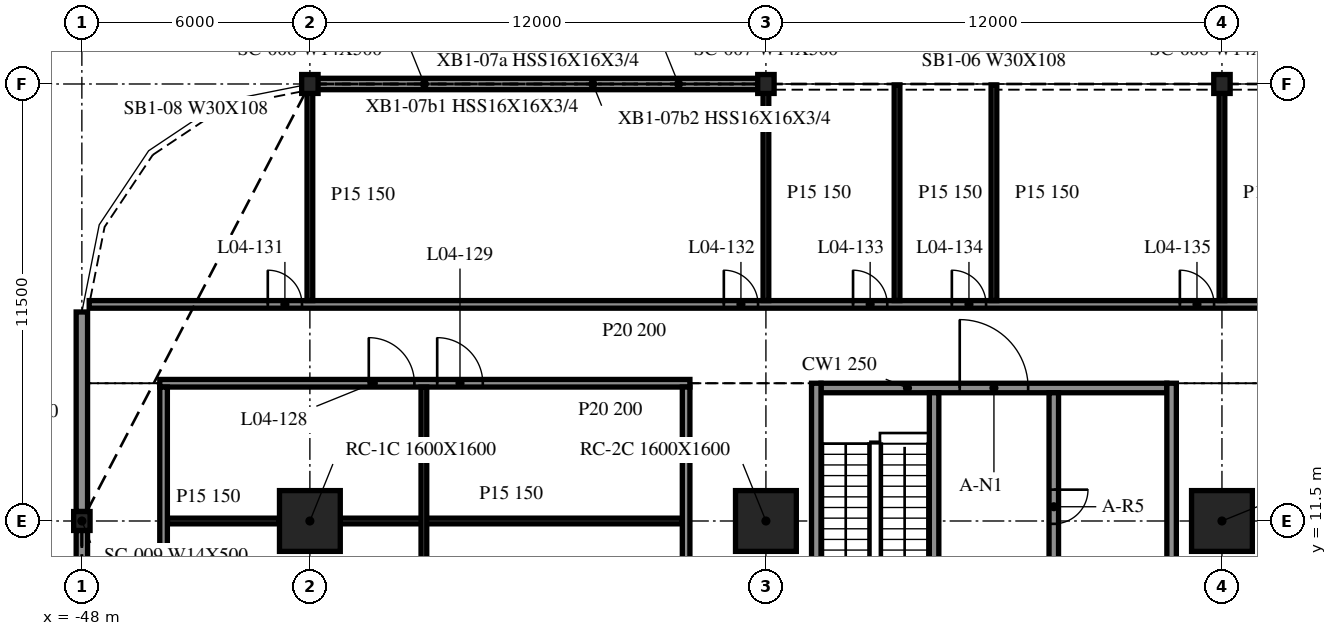
"""IFC4 building model, lengths in metres.
Left out: names, types, materials, properties, quantities, classifications, styles, units other than length and angle.
Written with IfcOpenShell. Run it as: python <this file> out.ifc"""

import sys

from ifc_helpers import new_model, si_unit, direction, frame, frame_2d, origin, origin_2d, place, context, subcontext, project, spatial, rectangle, i_section, extrude, element, fill, save


model = new_model("IFC4")
c1 = context("Model", 3, precision=1e-05, world=origin(), true_north=direction((0.0, 1.0)))
c2 = subcontext(c1, "Body", "Model", "MODEL_VIEW")
j1 = project(units=[si_unit("LENGTHUNIT", "METRE"), si_unit("PLANEANGLEUNIT", "RADIAN")], contexts=[c1])
p1 = place(None, origin())
s1 = spatial("IfcSite", under=j1, at=p1, CompositionType="ELEMENT")
p2 = place(p1, origin())
s2 = spatial("IfcBuilding", under=s1, at=p2, CompositionType="ELEMENT")
p3 = place(p2, frame((0.0, 0.0, 20.1)))
s3 = spatial("IfcBuildingStorey", under=s2, at=p3, CompositionType="ELEMENT", Elevation=20.1)
for number, where, z_axis, x_axis in (
    (1, (-42.0, 11.5, -0.34), (0.0, 0.0, 1.0), (1.0, 0.0, 0.0)),
    (2, (-30.0, 11.5, -0.34), (0.0, 0.0, 1.0), (1.0, 0.0, 0.0)),
    (3, (-18.0, 11.5, -0.34), (0.0, 0.0, 1.0), (1.0, 0.0, 0.0)),
):
    element("IfcColumn", number, at=place(p3, frame(where, z_axis=z_axis, x_axis=x_axis)), inside=s3, PredefinedType="COLUMN", context=c2, shape_type="SweptSolid", body=[
        extrude(rectangle(XDim=1.6, YDim=1.6, at=origin_2d()), origin(), (0.0, 0.0, 1.0), 4.3),
    ])
for number, where, z_axis, x_axis in (
    (4, (-18.0, 23.0, -0.34), (0.0, 0.0, 1.0), (1.0, 0.0, 0.0)),
    (5, (-30.0, 23.0, -0.34), (0.0, 0.0, 1.0), (1.0, 0.0, 0.0)),
    (6, (-42.0, 23.0, -0.34), (0.0, 0.0, 1.0), (1.0, 0.0, 0.0)),
    (7, (-48.0, 11.5, -0.34), (0.0, 0.0, 1.0), (1.0, 0.0, 0.0)),
):
    element("IfcColumn", number, at=place(p3, frame(where, z_axis=z_axis, x_axis=x_axis)), inside=s3, PredefinedType="COLUMN", context=c2, shape_type="SweptSolid", body=[
        extrude(i_section(OverallWidth=0.432, OverallDepth=0.498, WebThickness=0.056, FlangeThickness=0.089, at=origin_2d()), origin(), (0.0, 0.0, 1.0), 4.3),
    ])
p4 = place(p3, frame((-30.028, 23.0, 0.0), z_axis=(0.0, 0.0, 1.0), x_axis=(-1.0, 0.0, 0.0)))
e8 = element("IfcWall", 8, at=p4, inside=s3, PredefinedType="NOTDEFINED", context=c2, shape_type="SweptSolid", body=[
    extrude(rectangle(XDim=11.944, YDim=0.3, at=frame_2d((5.972, 0.0))), origin(), (0.0, 0.0, 1.0), 3.203),
])
p5 = place(p3, frame((-48.0, 17.0, 0.0), z_axis=(0.0, 0.0, 1.0), x_axis=(0.0, -1.0, 0.0)))
e9 = element("IfcWall", 9, at=p5, inside=s3, PredefinedType="NOTDEFINED", context=c2, shape_type="SweptSolid", body=[
    extrude(rectangle(XDim=5.251, YDim=0.3, at=frame_2d((2.625, 0.0))), origin(), (0.0, 0.0, 1.0), 3.203),
])
p6 = place(p3, frame((-48.0, 11.251, 0.0), z_axis=(0.0, 0.0, 1.0), x_axis=(0.0, -1.0, 0.0)))
e10 = element("IfcWall", 10, at=p6, inside=s3, PredefinedType="NOTDEFINED", context=c2, shape_type="SweptSolid", body=[
    extrude(rectangle(XDim=11.002, YDim=0.3, at=frame_2d((5.501, 0.0))), origin(), (0.0, 0.0, 1.0), 3.203),
])
for number, where, z_axis, x_axis in (
    (11, (-28.675, 15.125, 0.0), (0.0, 0.0, 1.0), (0.0, -1.0, 0.0)),
    (12, (-19.325, -9.125, 0.0), (0.0, 0.0, 1.0), (0.0, 1.0, 0.0)),
):
    element("IfcWall", number, at=place(p3, frame(where, z_axis=z_axis, x_axis=x_axis)), inside=s3, PredefinedType="SOLIDWALL", context=c2, shape_type="SweptSolid", body=[
        extrude(rectangle(XDim=24.25, YDim=0.25, at=frame_2d((12.125, 0.0))), origin(), (0.0, 0.0, 1.0), 3.96),
    ])
p7 = place(p3, frame((-28.55, 15.0, 0.0), z_axis=(0.0, 0.0, 1.0), x_axis=(1.0, 0.0, 0.0)))
e13 = element("IfcWall", 13, at=p7, inside=s3, PredefinedType="SOLIDWALL", context=c2, shape_type="SweptSolid", body=[
    extrude(rectangle(XDim=9.1, YDim=0.25, at=frame_2d((4.55, 0.0))), origin(), (0.0, 0.0, 1.0), 3.96),
])
p8 = place(p7, frame((3.65, 0.0, 0.0)))
e14 = element("IfcOpeningElement", 14, at=p8, cuts=e13, PredefinedType="OPENING", context=c2, shape_type="SweptSolid", body=[
    extrude(rectangle(XDim=1.8, YDim=2.1, at=frame_2d((0.9, 1.05))), frame((0.0, 0.135, 0.0), z_axis=(0.0, -1.0, 0.0), x_axis=(1.0, 0.0, 0.0)), (0.0, 0.0, 1.0), 0.27),
])
p9 = place(p3, frame((-25.575, 14.875, 0.0), z_axis=(0.0, 0.0, 1.0), x_axis=(0.0, -1.0, 0.0)))
e15 = element("IfcWall", 15, at=p9, inside=s3, PredefinedType="SOLIDWALL", context=c2, shape_type="SweptSolid", body=[
    extrude(rectangle(XDim=6.25, YDim=0.25, at=frame_2d((3.125, 0.0))), origin(), (0.0, 0.0, 1.0), 3.96),
])
p10 = place(p9, frame((4.85, 0.0, 0.0)))
e16 = element("IfcOpeningElement", 16, at=p10, cuts=e15, PredefinedType="OPENING", context=c2, shape_type="SweptSolid", body=[
    extrude(rectangle(XDim=1.0, YDim=2.1, at=frame_2d((0.5, 1.05))), frame((0.0, 0.135, 0.0), z_axis=(0.0, -1.0, 0.0), x_axis=(1.0, 0.0, 0.0)), (0.0, 0.0, 1.0), 0.27),
])
p11 = place(p3, frame((-22.425, 14.875, 0.0), z_axis=(0.0, 0.0, 1.0), x_axis=(0.0, -1.0, 0.0)))
e17 = element("IfcWall", 17, at=p11, inside=s3, PredefinedType="SOLIDWALL", context=c2, shape_type="SweptSolid", body=[
    extrude(rectangle(XDim=23.75, YDim=0.25, at=frame_2d((11.875, 0.0))), origin(), (0.0, 0.0, 1.0), 3.96),
])
p12 = place(p11, frame((15.45, 0.0, 0.0)))
e18 = element("IfcOpeningElement", 18, at=p12, cuts=e17, PredefinedType="OPENING", context=c2, shape_type="SweptSolid", body=[
    extrude(rectangle(XDim=1.1, YDim=2.1, at=frame_2d((0.55, 1.05))), frame((0.0, 0.135, 0.0), z_axis=(0.0, -1.0, 0.0), x_axis=(1.0, 0.0, 0.0)), (0.0, 0.0, 1.0), 0.27),
])
p13 = place(p11, frame((12.7, 0.0, 0.0)))
e19 = element("IfcOpeningElement", 19, at=p13, cuts=e17, PredefinedType="OPENING", context=c2, shape_type="SweptSolid", body=[
    extrude(rectangle(XDim=1.1, YDim=2.1, at=frame_2d((0.55, 1.05))), frame((0.0, 0.135, 0.0), z_axis=(0.0, -1.0, 0.0), x_axis=(1.0, 0.0, 0.0)), (0.0, 0.0, 1.0), 0.27),
])
p14 = place(p11, frame((22.137, 0.0, 0.0)))
e20 = element("IfcOpeningElement", 20, at=p14, cuts=e17, PredefinedType="OPENING", context=c2, shape_type="SweptSolid", body=[
    extrude(rectangle(XDim=0.9, YDim=2.1, at=frame_2d((0.45, 1.05))), frame((0.0, 0.135, 0.0), z_axis=(0.0, -1.0, 0.0), x_axis=(1.0, 0.0, 0.0)), (0.0, 0.0, 1.0), 0.27),
])
p15 = place(p11, frame((19.062, 0.0, 0.0)))
e21 = element("IfcOpeningElement", 21, at=p15, cuts=e17, PredefinedType="OPENING", context=c2, shape_type="SweptSolid", body=[
    extrude(rectangle(XDim=0.9, YDim=2.1, at=frame_2d((0.45, 1.05))), frame((0.0, 0.135, 0.0), z_axis=(0.0, -1.0, 0.0), x_axis=(1.0, 0.0, 0.0)), (0.0, 0.0, 1.0), 0.27),
])
p16 = place(p11, frame((2.55, 0.0, 0.0)))
e22 = element("IfcOpeningElement", 22, at=p16, cuts=e17, PredefinedType="OPENING", context=c2, shape_type="SweptSolid", body=[
    extrude(rectangle(XDim=0.9, YDim=2.1, at=frame_2d((0.45, 1.05))), frame((0.0, 0.135, 0.0), z_axis=(0.0, -1.0, 0.0), x_axis=(1.0, 0.0, 0.0)), (0.0, 0.0, 1.0), 0.27),
])
p17 = place(p3, frame((-45.75, 11.5, 0.0), z_axis=(0.0, 0.0, 1.0), x_axis=(1.0, 0.0, 0.0)))
e23 = element("IfcWall", 23, at=p17, inside=s3, PredefinedType="PARTITIONING", context=c2, shape_type="SweptSolid", body=[
    extrude(rectangle(XDim=2.95, YDim=0.15, at=frame_2d((1.475, 0.0))), origin(), (0.0, 0.0, 1.0), 3.96),
])
p18 = place(p3, frame((-41.2, 11.5, 0.0), z_axis=(0.0, 0.0, 1.0), x_axis=(1.0, 0.0, 0.0)))
e24 = element("IfcWall", 24, at=p18, inside=s3, PredefinedType="PARTITIONING", context=c2, shape_type="SweptSolid", body=[
    extrude(rectangle(XDim=9.0, YDim=0.15, at=frame_2d((4.5, 0.0))), origin(), (0.0, 0.0, 1.0), 3.96),
])
p19 = place(p3, frame((-45.95, 15.125, 0.0), z_axis=(0.0, 0.0, 1.0), x_axis=(1.0, 0.0, 0.0)))
e25 = element("IfcWall", 25, at=p19, inside=s3, PredefinedType="PARTITIONING", context=c2, shape_type="SweptSolid", body=[
    extrude(rectangle(XDim=13.95, YDim=0.2, at=frame_2d((6.975, 0.0))), origin(), (0.0, 0.0, 1.0), 3.96),
])
p20 = place(p19, frame((5.5, 0.0, 0.0)))
e26 = element("IfcOpeningElement", 26, at=p20, cuts=e25, PredefinedType="OPENING", context=c2, shape_type="SweptSolid", body=[
    extrude(rectangle(XDim=1.2, YDim=2.1, at=frame_2d((0.6, 1.05))), frame((0.0, 0.11, 0.0), z_axis=(0.0, -1.0, 0.0), x_axis=(1.0, 0.0, 0.0)), (0.0, 0.0, 1.0), 0.22),
])
p21 = place(p19, frame((7.3, 0.0, 0.0)))
e27 = element("IfcOpeningElement", 27, at=p21, cuts=e25, PredefinedType="OPENING", context=c2, shape_type="SweptSolid", body=[
    extrude(rectangle(XDim=1.2, YDim=2.1, at=frame_2d((0.6, 1.05))), frame((0.0, 0.11, 0.0), z_axis=(0.0, -1.0, 0.0), x_axis=(1.0, 0.0, 0.0)), (0.0, 0.0, 1.0), 0.22),
])
p22 = place(p3, frame((-47.807, 17.2, 0.0), z_axis=(0.0, 0.0, 1.0), x_axis=(1.0, 0.0, 0.0)))
e28 = element("IfcWall", 28, at=p22, inside=s3, PredefinedType="PARTITIONING", context=c2, shape_type="SweptSolid", body=[
    extrude(rectangle(XDim=95.615, YDim=0.2, at=frame_2d((47.807, 0.0))), origin(), (0.0, 0.0, 1.0), 3.96),
])
p23 = place(p22, frame((4.7, 0.0, 0.0)))
e29 = element("IfcOpeningElement", 29, at=p23, cuts=e28, PredefinedType="OPENING", context=c2, shape_type="SweptSolid", body=[
    extrude(rectangle(XDim=0.9, YDim=2.1, at=frame_2d((0.45, 1.05))), frame((0.0, 0.11, 0.0), z_axis=(0.0, -1.0, 0.0), x_axis=(1.0, 0.0, 0.0)), (0.0, 0.0, 1.0), 0.22),
])
p24 = place(p22, frame((16.7, 0.0, 0.0)))
e30 = element("IfcOpeningElement", 30, at=p24, cuts=e28, PredefinedType="OPENING", context=c2, shape_type="SweptSolid", body=[
    extrude(rectangle(XDim=0.9, YDim=2.1, at=frame_2d((0.45, 1.05))), frame((0.0, 0.11, 0.0), z_axis=(0.0, -1.0, 0.0), x_axis=(1.0, 0.0, 0.0)), (0.0, 0.0, 1.0), 0.22),
])
p25 = place(p22, frame((20.1, 0.0, 0.0)))
e31 = element("IfcOpeningElement", 31, at=p25, cuts=e28, PredefinedType="OPENING", context=c2, shape_type="SweptSolid", body=[
    extrude(rectangle(XDim=0.9, YDim=2.1, at=frame_2d((0.45, 1.05))), frame((0.0, 0.11, 0.0), z_axis=(0.0, -1.0, 0.0), x_axis=(1.0, 0.0, 0.0)), (0.0, 0.0, 1.0), 0.22),
])
p26 = place(p22, frame((22.7, 0.0, 0.0)))
e32 = element("IfcOpeningElement", 32, at=p26, cuts=e28, PredefinedType="OPENING", context=c2, shape_type="SweptSolid", body=[
    extrude(rectangle(XDim=0.9, YDim=2.1, at=frame_2d((0.45, 1.05))), frame((0.0, 0.11, 0.0), z_axis=(0.0, -1.0, 0.0), x_axis=(1.0, 0.0, 0.0)), (0.0, 0.0, 1.0), 0.22),
])
p27 = place(p22, frame((28.7, 0.0, 0.0)))
e33 = element("IfcOpeningElement", 33, at=p27, cuts=e28, PredefinedType="OPENING", context=c2, shape_type="SweptSolid", body=[
    extrude(rectangle(XDim=0.9, YDim=2.1, at=frame_2d((0.45, 1.05))), frame((0.0, 0.11, 0.0), z_axis=(0.0, -1.0, 0.0), x_axis=(1.0, 0.0, 0.0)), (0.0, 0.0, 1.0), 0.22),
])
p28 = place(p22, frame((40.7, 0.0, 0.0)))
e34 = element("IfcOpeningElement", 34, at=p28, cuts=e28, PredefinedType="OPENING", context=c2, shape_type="SweptSolid", body=[
    extrude(rectangle(XDim=0.9, YDim=2.1, at=frame_2d((0.45, 1.05))), frame((0.0, 0.11, 0.0), z_axis=(0.0, -1.0, 0.0), x_axis=(1.0, 0.0, 0.0)), (0.0, 0.0, 1.0), 0.22),
])
p29 = place(p22, frame((44.1, 0.0, 0.0)))
e35 = element("IfcOpeningElement", 35, at=p29, cuts=e28, PredefinedType="OPENING", context=c2, shape_type="SweptSolid", body=[
    extrude(rectangle(XDim=0.9, YDim=2.1, at=frame_2d((0.45, 1.05))), frame((0.0, 0.11, 0.0), z_axis=(0.0, -1.0, 0.0), x_axis=(1.0, 0.0, 0.0)), (0.0, 0.0, 1.0), 0.22),
])
p30 = place(p22, frame((46.7, 0.0, 0.0)))
e36 = element("IfcOpeningElement", 36, at=p30, cuts=e28, PredefinedType="OPENING", context=c2, shape_type="SweptSolid", body=[
    extrude(rectangle(XDim=0.9, YDim=2.1, at=frame_2d((0.45, 1.05))), frame((0.0, 0.11, 0.0), z_axis=(0.0, -1.0, 0.0), x_axis=(1.0, 0.0, 0.0)), (0.0, 0.0, 1.0), 0.22),
])
p31 = place(p22, frame((48.1, 0.0, 0.0)))
e37 = element("IfcOpeningElement", 37, at=p31, cuts=e28, PredefinedType="OPENING", context=c2, shape_type="SweptSolid", body=[
    extrude(rectangle(XDim=0.9, YDim=2.1, at=frame_2d((0.45, 1.05))), frame((0.0, 0.11, 0.0), z_axis=(0.0, -1.0, 0.0), x_axis=(1.0, 0.0, 0.0)), (0.0, 0.0, 1.0), 0.22),
])
p32 = place(p22, frame((54.1, 0.0, 0.0)))
e38 = element("IfcOpeningElement", 38, at=p32, cuts=e28, PredefinedType="OPENING", context=c2, shape_type="SweptSolid", body=[
    extrude(rectangle(XDim=0.9, YDim=2.1, at=frame_2d((0.45, 1.05))), frame((0.0, 0.11, 0.0), z_axis=(0.0, -1.0, 0.0), x_axis=(1.0, 0.0, 0.0)), (0.0, 0.0, 1.0), 0.22),
])
p33 = place(p22, frame((66.1, 0.0, 0.0)))
e39 = element("IfcOpeningElement", 39, at=p33, cuts=e28, PredefinedType="OPENING", context=c2, shape_type="SweptSolid", body=[
    extrude(rectangle(XDim=0.9, YDim=2.1, at=frame_2d((0.45, 1.05))), frame((0.0, 0.11, 0.0), z_axis=(0.0, -1.0, 0.0), x_axis=(1.0, 0.0, 0.0)), (0.0, 0.0, 1.0), 0.22),
])
p34 = place(p22, frame((69.5, 0.0, 0.0)))
e40 = element("IfcOpeningElement", 40, at=p34, cuts=e28, PredefinedType="OPENING", context=c2, shape_type="SweptSolid", body=[
    extrude(rectangle(XDim=0.9, YDim=2.1, at=frame_2d((0.45, 1.05))), frame((0.0, 0.11, 0.0), z_axis=(0.0, -1.0, 0.0), x_axis=(1.0, 0.0, 0.0)), (0.0, 0.0, 1.0), 0.22),
])
p35 = place(p22, frame((72.1, 0.0, 0.0)))
e41 = element("IfcOpeningElement", 41, at=p35, cuts=e28, PredefinedType="OPENING", context=c2, shape_type="SweptSolid", body=[
    extrude(rectangle(XDim=0.9, YDim=2.1, at=frame_2d((0.45, 1.05))), frame((0.0, 0.11, 0.0), z_axis=(0.0, -1.0, 0.0), x_axis=(1.0, 0.0, 0.0)), (0.0, 0.0, 1.0), 0.22),
])
p36 = place(p22, frame((78.1, 0.0, 0.0)))
e42 = element("IfcOpeningElement", 42, at=p36, cuts=e28, PredefinedType="OPENING", context=c2, shape_type="SweptSolid", body=[
    extrude(rectangle(XDim=0.9, YDim=2.1, at=frame_2d((0.45, 1.05))), frame((0.0, 0.11, 0.0), z_axis=(0.0, -1.0, 0.0), x_axis=(1.0, 0.0, 0.0)), (0.0, 0.0, 1.0), 0.22),
])
p37 = place(p22, frame((90.1, 0.0, 0.0)))
e43 = element("IfcOpeningElement", 43, at=p37, cuts=e28, PredefinedType="OPENING", context=c2, shape_type="SweptSolid", body=[
    extrude(rectangle(XDim=0.9, YDim=2.1, at=frame_2d((0.45, 1.05))), frame((0.0, 0.11, 0.0), z_axis=(0.0, -1.0, 0.0), x_axis=(1.0, 0.0, 0.0)), (0.0, 0.0, 1.0), 0.22),
])
p38 = place(p3, frame((-45.85, -9.025, 0.0), z_axis=(0.0, 0.0, 1.0), x_axis=(0.0, 1.0, 0.0)))
e44 = element("IfcWall", 44, at=p38, inside=s3, PredefinedType="PARTITIONING", context=c2, shape_type="SweptSolid", body=[
    extrude(rectangle(XDim=24.05, YDim=0.2, at=frame_2d((12.025, 0.0))), origin(), (0.0, 0.0, 1.0), 3.96),
])
p39 = place(p38, frame((11.5, 0.0, 0.0)))
e45 = element("IfcOpeningElement", 45, at=p39, cuts=e44, PredefinedType="OPENING", context=c2, shape_type="SweptSolid", body=[
    extrude(rectangle(XDim=1.2, YDim=2.1, at=frame_2d((0.6, 1.05))), frame((0.0, 0.11, 0.0), z_axis=(0.0, -1.0, 0.0), x_axis=(1.0, 0.0, 0.0)), (0.0, 0.0, 1.0), 0.22),
])
p40 = place(p3, frame((-42.0, 17.3, 0.0), z_axis=(0.0, 0.0, 1.0), x_axis=(0.0, 1.0, 0.0)))
e46 = element("IfcWall", 46, at=p40, inside=s3, PredefinedType="PARTITIONING", context=c2, shape_type="SweptSolid", body=[
    extrude(rectangle(XDim=5.547, YDim=0.15, at=frame_2d((2.773, 0.0))), origin(), (0.0, 0.0, 1.0), 3.96),
])
p41 = place(p3, frame((-39.0, -9.025, 0.0), z_axis=(0.0, 0.0, 1.0), x_axis=(0.0, 1.0, 0.0)))
e47 = element("IfcWall", 47, at=p41, inside=s3, PredefinedType="PARTITIONING", context=c2, shape_type="SweptSolid", body=[
    extrude(rectangle(XDim=24.05, YDim=0.15, at=frame_2d((12.025, 0.0))), origin(), (0.0, 0.0, 1.0), 3.96),
])
p42 = place(p3, frame((-32.1, -9.025, 0.0), z_axis=(0.0, 0.0, 1.0), x_axis=(0.0, 1.0, 0.0)))
e48 = element("IfcWall", 48, at=p42, inside=s3, PredefinedType="PARTITIONING", context=c2, shape_type="SweptSolid", body=[
    extrude(rectangle(XDim=24.05, YDim=0.2, at=frame_2d((12.025, 0.0))), origin(), (0.0, 0.0, 1.0), 3.96),
])
p43 = place(p42, frame((11.5, 0.0, 0.0)))
e49 = element("IfcOpeningElement", 49, at=p43, cuts=e48, PredefinedType="OPENING", context=c2, shape_type="SweptSolid", body=[
    extrude(rectangle(XDim=1.2, YDim=2.1, at=frame_2d((0.6, 1.05))), frame((0.0, 0.11, 0.0), z_axis=(0.0, -1.0, 0.0), x_axis=(1.0, 0.0, 0.0)), (0.0, 0.0, 1.0), 0.22),
])
for number, where, z_axis, x_axis in (
    (50, (-30.0, 17.3, 0.0), (0.0, 0.0, 1.0), (0.0, 1.0, 0.0)),
    (51, (-26.55, 17.3, 0.0), (0.0, 0.0, 1.0), (0.0, 1.0, 0.0)),
    (52, (-24.0, 17.3, 0.0), (0.0, 0.0, 1.0), (0.0, 1.0, 0.0)),
    (53, (-18.0, 17.3, 0.0), (0.0, 0.0, 1.0), (0.0, 1.0, 0.0)),
):
    element("IfcWall", number, at=place(p3, frame(where, z_axis=z_axis, x_axis=x_axis)), inside=s3, PredefinedType="PARTITIONING", context=c2, shape_type="SweptSolid", body=[
        extrude(rectangle(XDim=5.675, YDim=0.15, at=frame_2d((2.837, 0.0))), origin(), (0.0, 0.0, 1.0), 3.96),
    ])
p44 = place(p8, origin())
e54 = element("IfcDoor", 54, at=p44, inside=s3, OperationType="DOUBLE_DOOR_SINGLE_SWING", PredefinedType="DOOR", context=c2, shape_type="SweptSolid", body=[
    extrude(rectangle(XDim=1.8, YDim=2.1, at=frame_2d((0.9, 1.05))), frame((0.0, 0.025, 0.0), z_axis=(0.0, -1.0, 0.0), x_axis=(1.0, 0.0, 0.0)), (0.0, 0.0, 1.0), 0.05),
])
fill(e14, e54)
p45 = place(p16, origin())
e55 = element("IfcDoor", 55, at=p45, inside=s3, OperationType="SINGLE_SWING_LEFT", PredefinedType="DOOR", context=c2, shape_type="SweptSolid", body=[
    extrude(rectangle(XDim=0.9, YDim=2.1, at=frame_2d((0.45, 1.05))), frame((0.0, 0.025, 0.0), z_axis=(0.0, -1.0, 0.0), x_axis=(1.0, 0.0, 0.0)), (0.0, 0.0, 1.0), 0.05),
])
fill(e22, e55)
p46 = place(p20, origin())
e56 = element("IfcDoor", 56, at=p46, inside=s3, OperationType="SINGLE_SWING_RIGHT", PredefinedType="DOOR", context=c2, shape_type="SweptSolid", body=[
    extrude(rectangle(XDim=1.2, YDim=2.1, at=frame_2d((0.6, 1.05))), frame((0.0, 0.025, 0.0), z_axis=(0.0, -1.0, 0.0), x_axis=(1.0, 0.0, 0.0)), (0.0, 0.0, 1.0), 0.05),
])
fill(e26, e56)
p47 = place(p21, origin())
e57 = element("IfcDoor", 57, at=p47, inside=s3, OperationType="SINGLE_SWING_LEFT", PredefinedType="DOOR", context=c2, shape_type="SweptSolid", body=[
    extrude(rectangle(XDim=1.2, YDim=2.1, at=frame_2d((0.6, 1.05))), frame((0.0, 0.025, 0.0), z_axis=(0.0, -1.0, 0.0), x_axis=(1.0, 0.0, 0.0)), (0.0, 0.0, 1.0), 0.05),
])
fill(e27, e57)
p48 = place(p23, origin())
e58 = element("IfcDoor", 58, at=p48, inside=s3, OperationType="SINGLE_SWING_LEFT", PredefinedType="DOOR", context=c2, shape_type="SweptSolid", body=[
    extrude(rectangle(XDim=0.9, YDim=2.1, at=frame_2d((0.45, 1.05))), frame((0.0, 0.025, 0.0), z_axis=(0.0, -1.0, 0.0), x_axis=(1.0, 0.0, 0.0)), (0.0, 0.0, 1.0), 0.05),
])
fill(e29, e58)
p49 = place(p24, origin())
e59 = element("IfcDoor", 59, at=p49, inside=s3, OperationType="SINGLE_SWING_LEFT", PredefinedType="DOOR", context=c2, shape_type="SweptSolid", body=[
    extrude(rectangle(XDim=0.9, YDim=2.1, at=frame_2d((0.45, 1.05))), frame((0.0, 0.025, 0.0), z_axis=(0.0, -1.0, 0.0), x_axis=(1.0, 0.0, 0.0)), (0.0, 0.0, 1.0), 0.05),
])
fill(e30, e59)
p50 = place(p25, origin())
e60 = element("IfcDoor", 60, at=p50, inside=s3, OperationType="SINGLE_SWING_LEFT", PredefinedType="DOOR", context=c2, shape_type="SweptSolid", body=[
    extrude(rectangle(XDim=0.9, YDim=2.1, at=frame_2d((0.45, 1.05))), frame((0.0, 0.025, 0.0), z_axis=(0.0, -1.0, 0.0), x_axis=(1.0, 0.0, 0.0)), (0.0, 0.0, 1.0), 0.05),
])
fill(e31, e60)
p51 = place(p26, origin())
e61 = element("IfcDoor", 61, at=p51, inside=s3, OperationType="SINGLE_SWING_LEFT", PredefinedType="DOOR", context=c2, shape_type="SweptSolid", body=[
    extrude(rectangle(XDim=0.9, YDim=2.1, at=frame_2d((0.45, 1.05))), frame((0.0, 0.025, 0.0), z_axis=(0.0, -1.0, 0.0), x_axis=(1.0, 0.0, 0.0)), (0.0, 0.0, 1.0), 0.05),
])
fill(e32, e61)
p52 = place(p27, origin())
e62 = element("IfcDoor", 62, at=p52, inside=s3, OperationType="SINGLE_SWING_LEFT", PredefinedType="DOOR", context=c2, shape_type="SweptSolid", body=[
    extrude(rectangle(XDim=0.9, YDim=2.1, at=frame_2d((0.45, 1.05))), frame((0.0, 0.025, 0.0), z_axis=(0.0, -1.0, 0.0), x_axis=(1.0, 0.0, 0.0)), (0.0, 0.0, 1.0), 0.05),
])
fill(e33, e62)
save(model, sys.argv[1])
